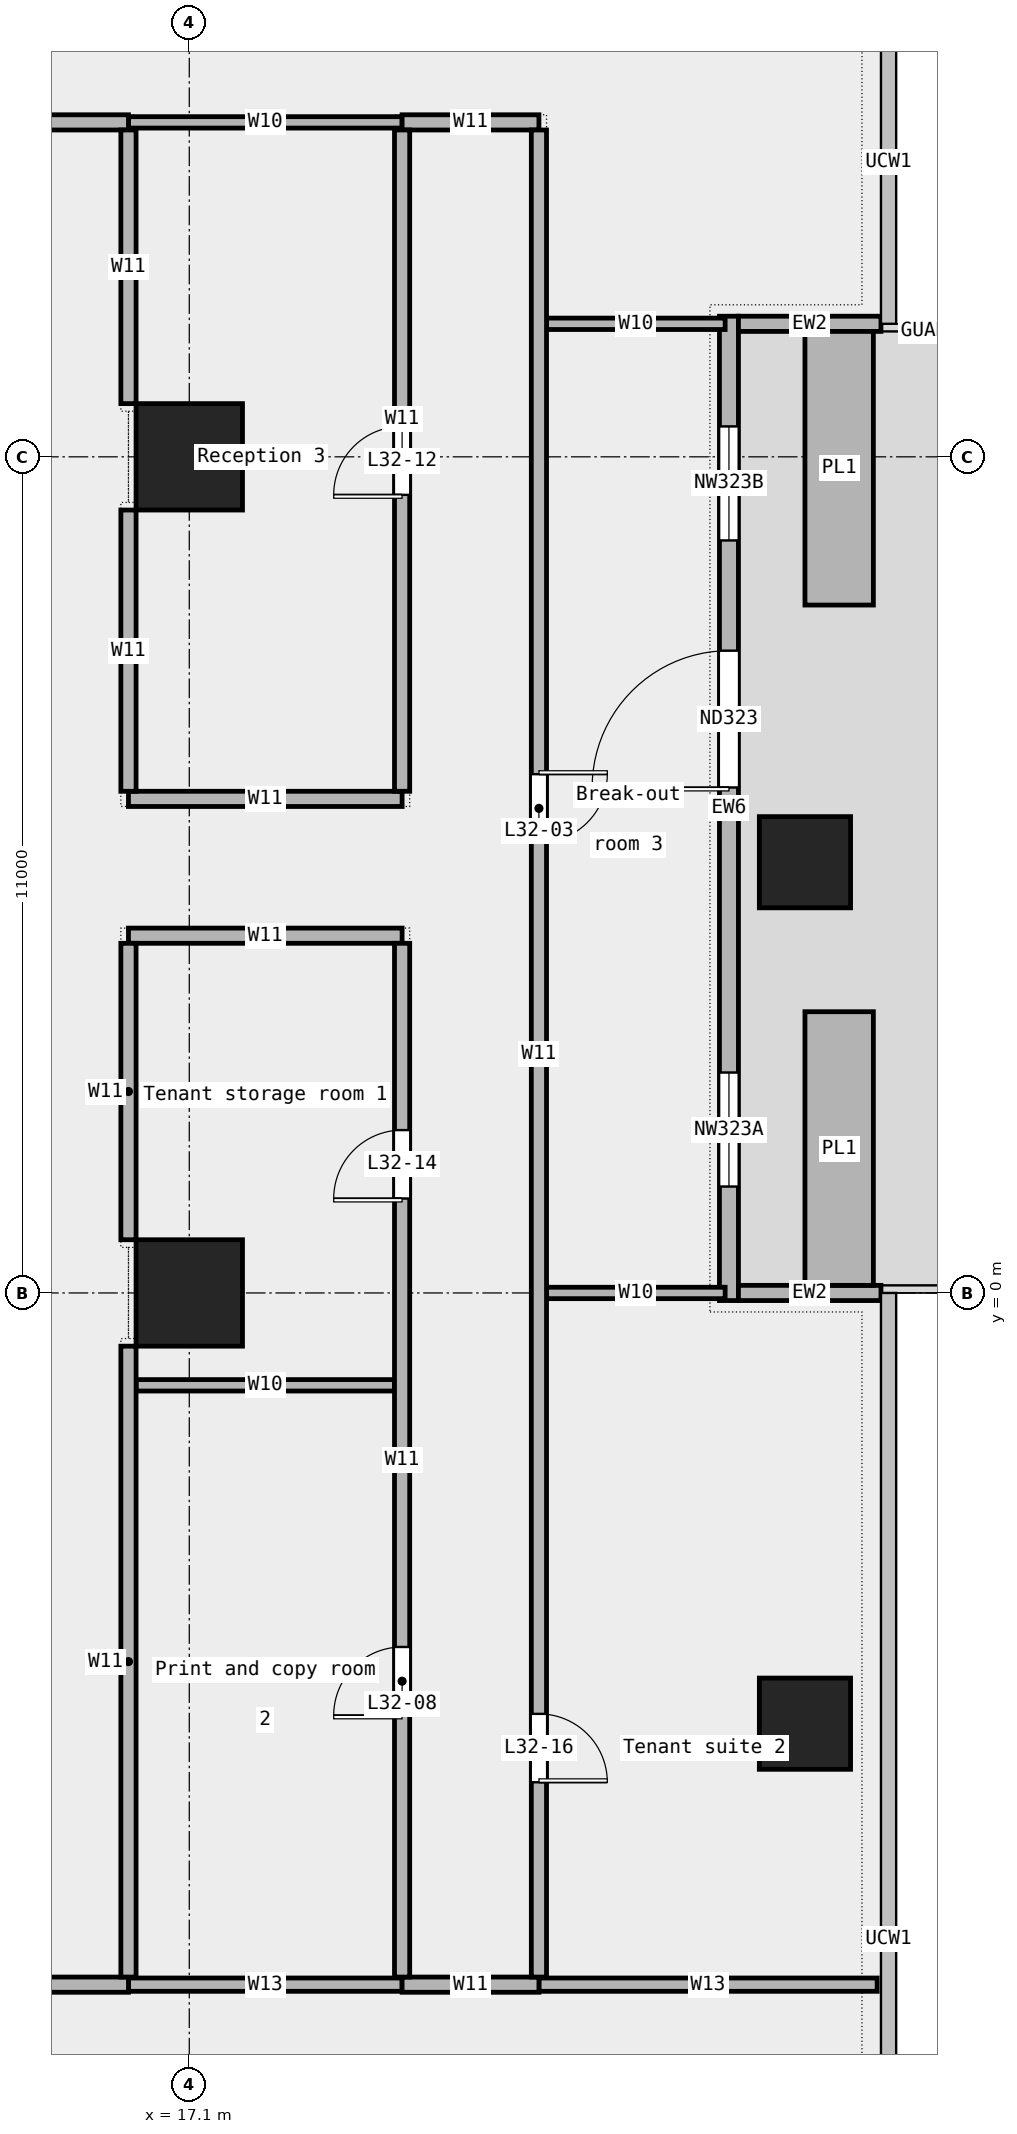
"""IFC4 building model, lengths in metres.
Left out: names, types, materials, properties, quantities, classifications, styles, units other than length and angle.
Written with IfcOpenShell. Run it as: python <this file> out.ifc"""

import sys

from ifc_helpers import new_model, si_unit, direction, frame, frame_2d, origin, origin_2d, place, context, subcontext, project, spatial, rectangle, extrude, element, fill, save


model = new_model("IFC4")
c1 = context("Model", 3, precision=1e-05, world=origin(), true_north=direction((0.0, 1.0)))
c2 = subcontext(c1, "Body", "Model", "MODEL_VIEW")
j1 = project(units=[si_unit("LENGTHUNIT", "METRE"), si_unit("PLANEANGLEUNIT", "RADIAN")], contexts=[c1])
p1 = place(None, origin())
s1 = spatial("IfcSite", under=j1, at=p1, CompositionType="ELEMENT")
p2 = place(p1, origin())
s2 = spatial("IfcBuilding", under=s1, at=p2, CompositionType="ELEMENT")
p3 = place(p2, frame((0.0, 0.0, 161.0)))
s3 = spatial("IfcBuildingStorey", under=s2, at=p3, CompositionType="ELEMENT", Elevation=161.0)
for number, where, z_axis, x_axis in (
    (1, (25.2, -5.667, 0.0), (0.0, 0.0, 1.0), (1.0, 0.0, 0.0)),
    (2, (25.2, 5.667, 0.0), (0.0, 0.0, 1.0), (1.0, 0.0, 0.0)),
):
    element("IfcColumn", number, at=place(p3, frame(where, z_axis=z_axis, x_axis=x_axis)), inside=s3, PredefinedType="COLUMN", context=c2, shape_type="SweptSolid", body=[
        extrude(rectangle(XDim=1.2, YDim=1.2, at=origin_2d()), origin(), (0.0, 0.0, 1.0), 3.6),
    ])
for number, where, z_axis, x_axis in (
    (3, (17.1, 0.0, 0.0), (0.0, 0.0, 1.0), (1.0, 0.0, 0.0)),
    (4, (17.1, 11.0, 0.0), (0.0, 0.0, 1.0), (1.0, 0.0, 0.0)),
):
    element("IfcColumn", number, at=place(p3, frame(where, z_axis=z_axis, x_axis=x_axis)), inside=s3, PredefinedType="COLUMN", context=c2, shape_type="SweptSolid", body=[
        extrude(rectangle(XDim=1.4, YDim=1.4, at=origin_2d()), origin(), (0.0, 0.0, 1.0), 3.6),
    ])
p4 = place(p3, frame((24.2, -0.1, 0.0), z_axis=(0.0, 0.0, 1.0), x_axis=(0.0, 1.0, 0.0)))
e5 = element("IfcWall", 5, at=p4, inside=s3, PredefinedType="STANDARD", context=c2, shape_type="SweptSolid", body=[
    extrude(rectangle(XDim=12.95, YDim=0.25, at=frame_2d((6.475, 0.0))), origin(), (0.0, 0.0, 1.0), 3.6),
])
p5 = place(p4, frame((1.5, 0.0, 0.45)))
e6 = element("IfcOpeningElement", 6, at=p5, cuts=e5, PredefinedType="OPENING", context=c2, shape_type="SweptSolid", body=[
    extrude(rectangle(XDim=1.5, YDim=2.4, at=frame_2d((0.75, 1.2))), frame((0.0, 0.137, 0.0), z_axis=(0.0, -1.0, 0.0), x_axis=(1.0, 0.0, 0.0)), (0.0, 0.0, 1.0), 0.274),
])
p6 = place(p4, frame((6.75, 0.0, 0.0)))
e7 = element("IfcOpeningElement", 7, at=p6, cuts=e5, PredefinedType="OPENING", context=c2, shape_type="SweptSolid", body=[
    extrude(rectangle(XDim=1.8, YDim=2.4, at=frame_2d((0.9, 1.2))), frame((0.0, 0.137, 0.0), z_axis=(0.0, -1.0, 0.0), x_axis=(1.0, 0.0, 0.0)), (0.0, 0.0, 1.0), 0.274),
])
p7 = place(p4, frame((10.0, 0.0, 0.45)))
e8 = element("IfcOpeningElement", 8, at=p7, cuts=e5, PredefinedType="OPENING", context=c2, shape_type="SweptSolid", body=[
    extrude(rectangle(XDim=1.5, YDim=2.4, at=frame_2d((0.75, 1.2))), frame((0.0, 0.137, 0.0), z_axis=(0.0, -1.0, 0.0), x_axis=(1.0, 0.0, 0.0)), (0.0, 0.0, 1.0), 0.274),
])
for number, where, z_axis, x_axis in (
    (9, (26.2, 0.0, 0.0), (0.0, 0.0, 1.0), (-1.0, 0.0, 0.0)),
    (10, (26.2, 12.75, 0.0), (0.0, 0.0, 1.0), (-1.0, 0.0, 0.0)),
):
    element("IfcWall", number, at=place(p3, frame(where, z_axis=z_axis, x_axis=x_axis)), inside=s3, PredefinedType="STANDARD", context=c2, shape_type="SweptSolid", body=[
        extrude(rectangle(XDim=1.875, YDim=0.2, at=frame_2d((0.938, 0.0))), origin(), (0.0, 0.0, 1.0), 3.6),
    ])
for number, where, z_axis, x_axis in (
    (11, (25.65, 0.1, 0.0), (0.0, 0.0, 1.0), (0.0, 1.0, 0.0)),
    (12, (25.65, 9.05, 0.0), (0.0, 0.0, 1.0), (0.0, 1.0, 0.0)),
):
    element("IfcWall", number, at=place(p3, frame(where, z_axis=z_axis, x_axis=x_axis)), inside=s3, PredefinedType="STANDARD", context=c2, shape_type="SweptSolid", body=[
        extrude(rectangle(XDim=3.6, YDim=0.9, at=frame_2d((1.8, 0.0))), origin(), (0.0, 0.0, 1.0), 0.7),
    ])
p8 = place(p3, frame((16.3, -9.1, 0.0), z_axis=(0.0, 0.0, 1.0), x_axis=(1.0, 0.0, 0.0)))
e13 = element("IfcWall", 13, at=p8, inside=s3, PredefinedType="PARTITIONING", context=c2, shape_type="SweptSolid", body=[
    extrude(rectangle(XDim=3.6, YDim=0.175, at=frame_2d((1.8, 0.0))), origin(), (0.0, 0.0, 1.0), 3.6),
])
p9 = place(p3, frame((21.7, -9.1, 0.0), z_axis=(0.0, 0.0, 1.0), x_axis=(1.0, 0.0, 0.0)))
e14 = element("IfcWall", 14, at=p9, inside=s3, PredefinedType="PARTITIONING", context=c2, shape_type="SweptSolid", body=[
    extrude(rectangle(XDim=4.45, YDim=0.175, at=frame_2d((2.225, 0.0))), origin(), (0.0, 0.0, 1.0), 3.6),
])
p10 = place(p3, frame((-9.48, -9.1, 0.0), z_axis=(0.0, 0.0, 1.0), x_axis=(1.0, 0.0, 0.0)))
e15 = element("IfcWall", 15, at=p10, inside=s3, PredefinedType="PARTITIONING", context=c2, shape_type="SweptSolid", body=[
    extrude(rectangle(XDim=25.78, YDim=0.2, at=frame_2d((12.89, 0.0))), origin(), (0.0, 0.0, 1.0), 3.6),
])
p11 = place(p3, frame((19.9, -9.1, 0.0), z_axis=(0.0, 0.0, 1.0), x_axis=(1.0, 0.0, 0.0)))
e16 = element("IfcWall", 16, at=p11, inside=s3, PredefinedType="PARTITIONING", context=c2, shape_type="SweptSolid", body=[
    extrude(rectangle(XDim=1.8, YDim=0.2, at=frame_2d((0.9, 0.0))), origin(), (0.0, 0.0, 1.0), 3.6),
])
p12 = place(p3, frame((16.4, -1.215, 0.0), z_axis=(0.0, 0.0, 1.0), x_axis=(1.0, 0.0, 0.0)))
e17 = element("IfcWall", 17, at=p12, inside=s3, PredefinedType="PARTITIONING", context=c2, shape_type="SweptSolid", body=[
    extrude(rectangle(XDim=3.4, YDim=0.15, at=frame_2d((1.7, 0.0))), origin(), (0.0, 0.0, 1.0), 3.6),
])
p13 = place(p3, frame((21.8, 0.0, 0.0), z_axis=(0.0, 0.0, 1.0), x_axis=(1.0, 0.0, 0.0)))
e18 = element("IfcWall", 18, at=p13, inside=s3, PredefinedType="PARTITIONING", context=c2, shape_type="SweptSolid", body=[
    extrude(rectangle(XDim=2.35, YDim=0.15, at=frame_2d((1.175, 0.0))), origin(), (0.0, 0.0, 1.0), 3.6),
])
for number, where, z_axis, x_axis in (
    (19, (16.3, 4.7, 0.0), (0.0, 0.0, 1.0), (1.0, 0.0, 0.0)),
    (20, (16.3, 6.5, 0.0), (0.0, 0.0, 1.0), (1.0, 0.0, 0.0)),
):
    element("IfcWall", number, at=place(p3, frame(where, z_axis=z_axis, x_axis=x_axis)), inside=s3, PredefinedType="PARTITIONING", context=c2, shape_type="SweptSolid", body=[
        extrude(rectangle(XDim=3.6, YDim=0.2, at=frame_2d((1.8, 0.0))), origin(), (0.0, 0.0, 1.0), 3.6),
    ])
p14 = place(p3, frame((21.8, 12.75, 0.0), z_axis=(0.0, 0.0, 1.0), x_axis=(1.0, 0.0, 0.0)))
e21 = element("IfcWall", 21, at=p14, inside=s3, PredefinedType="PARTITIONING", context=c2, shape_type="SweptSolid", body=[
    extrude(rectangle(XDim=2.35, YDim=0.15, at=frame_2d((1.175, 0.0))), origin(), (0.0, 0.0, 1.0), 3.6),
])
p15 = place(p3, frame((16.3, 15.4, 0.0), z_axis=(0.0, 0.0, 1.0), x_axis=(1.0, 0.0, 0.0)))
e22 = element("IfcWall", 22, at=p15, inside=s3, PredefinedType="PARTITIONING", context=c2, shape_type="SweptSolid", body=[
    extrude(rectangle(XDim=3.6, YDim=0.15, at=frame_2d((1.8, 0.0))), origin(), (0.0, 0.0, 1.0), 3.6),
])
p16 = place(p3, frame((-16.3, 15.4, 0.0), z_axis=(0.0, 0.0, 1.0), x_axis=(1.0, 0.0, 0.0)))
e23 = element("IfcWall", 23, at=p16, inside=s3, PredefinedType="PARTITIONING", context=c2, shape_type="SweptSolid", body=[
    extrude(rectangle(XDim=32.6, YDim=0.2, at=frame_2d((16.3, 0.0))), origin(), (0.0, 0.0, 1.0), 3.6),
])
p17 = place(p16, frame((24.992, 0.0, 0.0)))
e24 = element("IfcOpeningElement", 24, at=p17, cuts=e23, PredefinedType="OPENING", context=c2, shape_type="SweptSolid", body=[
    extrude(rectangle(XDim=1.8, YDim=2.1, at=frame_2d((0.9, 1.05))), frame((0.0, 0.112, 0.0), z_axis=(0.0, -1.0, 0.0), x_axis=(1.0, 0.0, 0.0)), (0.0, 0.0, 1.0), 0.224),
])
p18 = place(p16, frame((9.635, 0.0, 0.0)))
e25 = element("IfcOpeningElement", 25, at=p18, cuts=e23, PredefinedType="OPENING", context=c2, shape_type="SweptSolid", body=[
    extrude(rectangle(XDim=1.8, YDim=2.1, at=frame_2d((0.9, 1.05))), frame((0.0, 0.112, 0.0), z_axis=(0.0, -1.0, 0.0), x_axis=(1.0, 0.0, 0.0)), (0.0, 0.0, 1.0), 0.224),
])
p19 = place(p3, frame((19.9, 15.4, 0.0), z_axis=(0.0, 0.0, 1.0), x_axis=(1.0, 0.0, 0.0)))
e26 = element("IfcWall", 26, at=p19, inside=s3, PredefinedType="PARTITIONING", context=c2, shape_type="SweptSolid", body=[
    extrude(rectangle(XDim=1.8, YDim=0.2, at=frame_2d((0.9, 0.0))), origin(), (0.0, 0.0, 1.0), 3.6),
])
p20 = place(p3, frame((16.3, -9.0, 0.0), z_axis=(0.0, 0.0, 1.0), x_axis=(0.0, 1.0, 0.0)))
e27 = element("IfcWall", 27, at=p20, inside=s3, PredefinedType="PARTITIONING", context=c2, shape_type="SweptSolid", body=[
    extrude(rectangle(XDim=8.3, YDim=0.2, at=frame_2d((4.15, 0.0))), origin(), (0.0, 0.0, 1.0), 3.6),
])
p21 = place(p3, frame((16.3, 0.7, 0.0), z_axis=(0.0, 0.0, 1.0), x_axis=(0.0, 1.0, 0.0)))
e28 = element("IfcWall", 28, at=p21, inside=s3, PredefinedType="PARTITIONING", context=c2, shape_type="SweptSolid", body=[
    extrude(rectangle(XDim=3.9, YDim=0.2, at=frame_2d((1.95, 0.0))), origin(), (0.0, 0.0, 1.0), 3.6),
])
p22 = place(p3, frame((16.3, 6.6, 0.0), z_axis=(0.0, 0.0, 1.0), x_axis=(0.0, 1.0, 0.0)))
e29 = element("IfcWall", 29, at=p22, inside=s3, PredefinedType="PARTITIONING", context=c2, shape_type="SweptSolid", body=[
    extrude(rectangle(XDim=3.7, YDim=0.2, at=frame_2d((1.85, 0.0))), origin(), (0.0, 0.0, 1.0), 3.6),
])
p23 = place(p3, frame((16.3, 11.7, 0.0), z_axis=(0.0, 0.0, 1.0), x_axis=(0.0, 1.0, 0.0)))
e30 = element("IfcWall", 30, at=p23, inside=s3, PredefinedType="PARTITIONING", context=c2, shape_type="SweptSolid", body=[
    extrude(rectangle(XDim=3.6, YDim=0.2, at=frame_2d((1.8, 0.0))), origin(), (0.0, 0.0, 1.0), 3.6),
])
p24 = place(p3, frame((19.9, -9.0, 0.0), z_axis=(0.0, 0.0, 1.0), x_axis=(0.0, 1.0, 0.0)))
e31 = element("IfcWall", 31, at=p24, inside=s3, PredefinedType="PARTITIONING", context=c2, shape_type="SweptSolid", body=[
    extrude(rectangle(XDim=13.6, YDim=0.2, at=frame_2d((6.8, 0.0))), origin(), (0.0, 0.0, 1.0), 3.6),
])
p25 = place(p24, frame((3.442, 0.0, 0.0)))
e32 = element("IfcOpeningElement", 32, at=p25, cuts=e31, PredefinedType="OPENING", context=c2, shape_type="SweptSolid", body=[
    extrude(rectangle(XDim=0.9, YDim=2.1, at=frame_2d((0.45, 1.05))), frame((0.0, 0.112, 0.0), z_axis=(0.0, -1.0, 0.0), x_axis=(1.0, 0.0, 0.0)), (0.0, 0.0, 1.0), 0.224),
])
p26 = place(p24, frame((10.242, 0.0, 0.0)))
e33 = element("IfcOpeningElement", 33, at=p26, cuts=e31, PredefinedType="OPENING", context=c2, shape_type="SweptSolid", body=[
    extrude(rectangle(XDim=0.9, YDim=2.1, at=frame_2d((0.45, 1.05))), frame((0.0, 0.112, 0.0), z_axis=(0.0, -1.0, 0.0), x_axis=(1.0, 0.0, 0.0)), (0.0, 0.0, 1.0), 0.224),
])
p27 = place(p3, frame((19.9, 6.6, 0.0), z_axis=(0.0, 0.0, 1.0), x_axis=(0.0, 1.0, 0.0)))
e34 = element("IfcWall", 34, at=p27, inside=s3, PredefinedType="PARTITIONING", context=c2, shape_type="SweptSolid", body=[
    extrude(rectangle(XDim=8.7, YDim=0.2, at=frame_2d((4.35, 0.0))), origin(), (0.0, 0.0, 1.0), 3.6),
])
p28 = place(p27, frame((3.9, 0.0, 0.0)))
e35 = element("IfcOpeningElement", 35, at=p28, cuts=e34, PredefinedType="OPENING", context=c2, shape_type="SweptSolid", body=[
    extrude(rectangle(XDim=0.9, YDim=2.1, at=frame_2d((0.45, 1.05))), frame((0.0, 0.112, 0.0), z_axis=(0.0, -1.0, 0.0), x_axis=(1.0, 0.0, 0.0)), (0.0, 0.0, 1.0), 0.224),
])
p29 = place(p3, frame((21.7, -9.0, 0.0), z_axis=(0.0, 0.0, 1.0), x_axis=(0.0, 1.0, 0.0)))
e36 = element("IfcWall", 36, at=p29, inside=s3, PredefinedType="PARTITIONING", context=c2, shape_type="SweptSolid", body=[
    extrude(rectangle(XDim=24.3, YDim=0.2, at=frame_2d((12.15, 0.0))), origin(), (0.0, 0.0, 1.0), 3.6),
])
p30 = place(p29, frame((14.925, 0.0, 0.0)))
e37 = element("IfcOpeningElement", 37, at=p30, cuts=e36, PredefinedType="OPENING", context=c2, shape_type="SweptSolid", body=[
    extrude(rectangle(XDim=0.9, YDim=2.1, at=frame_2d((0.45, 1.05))), frame((0.0, 0.112, 0.0), z_axis=(0.0, -1.0, 0.0), x_axis=(1.0, 0.0, 0.0)), (0.0, 0.0, 1.0), 0.224),
])
p31 = place(p29, frame((2.562, 0.0, 0.0)))
e38 = element("IfcOpeningElement", 38, at=p31, cuts=e36, PredefinedType="OPENING", context=c2, shape_type="SweptSolid", body=[
    extrude(rectangle(XDim=0.9, YDim=2.1, at=frame_2d((0.45, 1.05))), frame((0.0, 0.112, 0.0), z_axis=(0.0, -1.0, 0.0), x_axis=(1.0, 0.0, 0.0)), (0.0, 0.0, 1.0), 0.224),
])
p32 = place(p5, origin())
e39 = element("IfcWindow", 39, at=p32, inside=s3, PartitioningType="SINGLE_PANEL", PredefinedType="WINDOW", context=c2, shape_type="SweptSolid", body=[
    extrude(rectangle(XDim=1.5, YDim=2.4, at=frame_2d((0.75, 1.2))), frame((0.0, 0.03, 0.0), z_axis=(0.0, -1.0, 0.0), x_axis=(1.0, 0.0, 0.0)), (0.0, 0.0, 1.0), 0.06),
])
fill(e6, e39)
p33 = place(p6, origin())
e40 = element("IfcDoor", 40, at=p33, inside=s3, OperationType="DOUBLE_DOOR_SINGLE_SWING", PredefinedType="DOOR", context=c2, shape_type="SweptSolid", body=[
    extrude(rectangle(XDim=1.8, YDim=2.4, at=frame_2d((0.9, 1.2))), frame((0.0, 0.025, 0.0), z_axis=(0.0, -1.0, 0.0), x_axis=(1.0, 0.0, 0.0)), (0.0, 0.0, 1.0), 0.05),
])
fill(e7, e40)
p34 = place(p7, origin())
e41 = element("IfcWindow", 41, at=p34, inside=s3, PartitioningType="SINGLE_PANEL", PredefinedType="WINDOW", context=c2, shape_type="SweptSolid", body=[
    extrude(rectangle(XDim=1.5, YDim=2.4, at=frame_2d((0.75, 1.2))), frame((0.0, 0.03, 0.0), z_axis=(0.0, -1.0, 0.0), x_axis=(1.0, 0.0, 0.0)), (0.0, 0.0, 1.0), 0.06),
])
fill(e8, e41)
p35 = place(p30, origin())
e42 = element("IfcDoor", 42, at=p35, inside=s3, OperationType="SINGLE_SWING_LEFT", PredefinedType="DOOR", context=c2, shape_type="SweptSolid", body=[
    extrude(rectangle(XDim=0.9, YDim=2.1, at=frame_2d((0.45, 1.05))), frame((0.0, 0.025, 0.0), z_axis=(0.0, -1.0, 0.0), x_axis=(1.0, 0.0, 0.0)), (0.0, 0.0, 1.0), 0.05),
])
fill(e37, e42)
p36 = place(p25, origin())
e43 = element("IfcDoor", 43, at=p36, inside=s3, OperationType="SINGLE_SWING_LEFT", PredefinedType="DOOR", context=c2, shape_type="SweptSolid", body=[
    extrude(rectangle(XDim=0.9, YDim=2.1, at=frame_2d((0.45, 1.05))), frame((0.0, 0.025, 0.0), z_axis=(0.0, -1.0, 0.0), x_axis=(1.0, 0.0, 0.0)), (0.0, 0.0, 1.0), 0.05),
])
fill(e32, e43)
p37 = place(p28, origin())
e44 = element("IfcDoor", 44, at=p37, inside=s3, OperationType="SINGLE_SWING_LEFT", PredefinedType="DOOR", context=c2, shape_type="SweptSolid", body=[
    extrude(rectangle(XDim=0.9, YDim=2.1, at=frame_2d((0.45, 1.05))), frame((0.0, 0.025, 0.0), z_axis=(0.0, -1.0, 0.0), x_axis=(1.0, 0.0, 0.0)), (0.0, 0.0, 1.0), 0.05),
])
fill(e35, e44)
p38 = place(p26, origin())
e45 = element("IfcDoor", 45, at=p38, inside=s3, OperationType="SINGLE_SWING_LEFT", PredefinedType="DOOR", context=c2, shape_type="SweptSolid", body=[
    extrude(rectangle(XDim=0.9, YDim=2.1, at=frame_2d((0.45, 1.05))), frame((0.0, 0.025, 0.0), z_axis=(0.0, -1.0, 0.0), x_axis=(1.0, 0.0, 0.0)), (0.0, 0.0, 1.0), 0.05),
])
fill(e33, e45)
p39 = place(p31, origin())
e46 = element("IfcDoor", 46, at=p39, inside=s3, OperationType="SINGLE_SWING_RIGHT", PredefinedType="DOOR", context=c2, shape_type="SweptSolid", body=[
    extrude(rectangle(XDim=0.9, YDim=2.1, at=frame_2d((0.45, 1.05))), frame((0.0, 0.025, 0.0), z_axis=(0.0, -1.0, 0.0), x_axis=(1.0, 0.0, 0.0)), (0.0, 0.0, 1.0), 0.05),
])
fill(e38, e46)
save(model, sys.argv[1])
